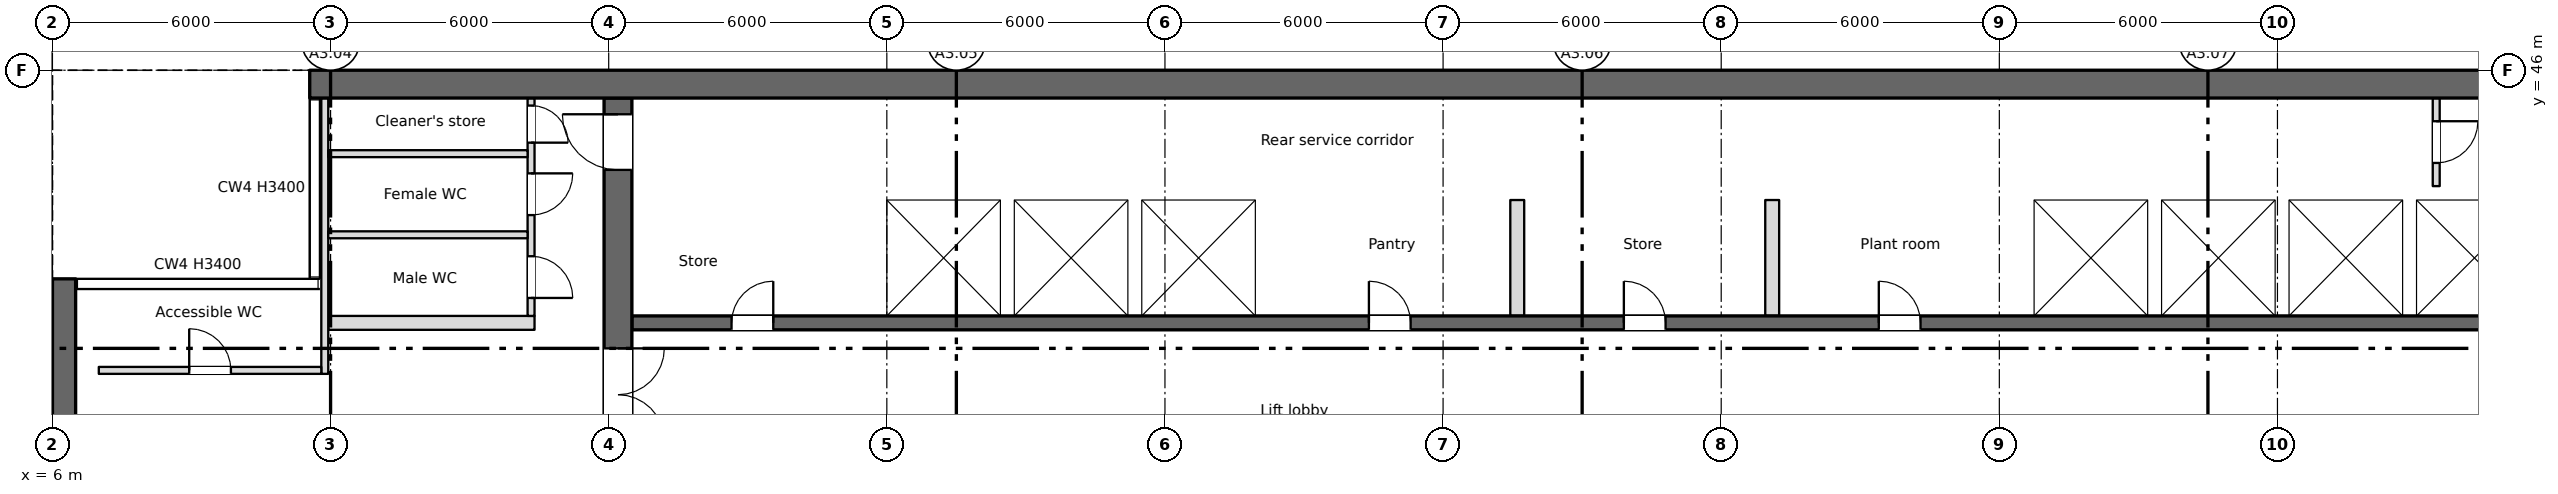
"""IFC4 building model, lengths in metres.
Left out: names, types, materials, properties, quantities, classifications, styles, units other than length and angle.
Written with IfcOpenShell. Run it as: python <this file> out.ifc"""

import sys

from ifc_helpers import new_model, si_unit, direction, frame, frame_2d, origin, place, context, subcontext, project, spatial, rectangle, extrude, element, fill, save


model = new_model("IFC4")
c1 = context("Model", 3, precision=1e-05, world=origin(), true_north=direction((0.0, 1.0)))
c2 = subcontext(c1, "Body", "Model", "MODEL_VIEW")
j1 = project(units=[si_unit("LENGTHUNIT", "METRE"), si_unit("PLANEANGLEUNIT", "RADIAN")], contexts=[c1])
p1 = place(None, origin())
s1 = spatial("IfcSite", under=j1, at=p1, CompositionType="ELEMENT")
p2 = place(p1, origin())
s2 = spatial("IfcBuilding", under=s1, at=p2, CompositionType="ELEMENT")
p3 = place(p2, frame((0.0, 0.0, 254.55)))
s3 = spatial("IfcBuildingStorey", under=s2, at=p3, CompositionType="ELEMENT", Elevation=254.55)
p4 = place(p3, frame((6.25, 8.5, 0.0), z_axis=(0.0, 0.0, 1.0), x_axis=(0.0, 1.0, 0.0)))
e1 = element("IfcWall", 1, at=p4, inside=s3, PredefinedType="SHEAR", context=c2, shape_type="SweptSolid", body=[
    extrude(rectangle(XDim=33.0, YDim=0.5, at=frame_2d((16.5, 0.0))), origin(), (0.0, 0.0, 1.0), 3.4),
])
p5 = place(p4, frame((1.2, 0.0, 0.6)))
e2 = element("IfcOpeningElement", 2, at=p5, cuts=e1, PredefinedType="OPENING", context=c2, shape_type="SweptSolid", body=[
    extrude(rectangle(XDim=0.6, YDim=2.4, at=frame_2d((0.3, 1.2))), frame((0.0, 0.26, 0.0), z_axis=(0.0, -1.0, 0.0), x_axis=(1.0, 0.0, 0.0)), (0.0, 0.0, 1.0), 0.52),
])
p6 = place(p4, frame((7.2, 0.0, 0.6)))
e3 = element("IfcOpeningElement", 3, at=p6, cuts=e1, PredefinedType="OPENING", context=c2, shape_type="SweptSolid", body=[
    extrude(rectangle(XDim=0.6, YDim=2.4, at=frame_2d((0.3, 1.2))), frame((0.0, 0.26, 0.0), z_axis=(0.0, -1.0, 0.0), x_axis=(1.0, 0.0, 0.0)), (0.0, 0.0, 1.0), 0.52),
])
p7 = place(p4, frame((13.2, 0.0, 0.6)))
e4 = element("IfcOpeningElement", 4, at=p7, cuts=e1, PredefinedType="OPENING", context=c2, shape_type="SweptSolid", body=[
    extrude(rectangle(XDim=0.6, YDim=2.4, at=frame_2d((0.3, 1.2))), frame((0.0, 0.26, 0.0), z_axis=(0.0, -1.0, 0.0), x_axis=(1.0, 0.0, 0.0)), (0.0, 0.0, 1.0), 0.52),
])
p8 = place(p3, frame((11.55, 45.7, 0.0), z_axis=(0.0, 0.0, 1.0), x_axis=(1.0, 0.0, 0.0)))
e5 = element("IfcWall", 5, at=p8, inside=s3, PredefinedType="SHEAR", context=c2, shape_type="SweptSolid", body=[
    extrude(rectangle(XDim=48.9, YDim=0.6, at=frame_2d((24.45, 0.0))), origin(), (0.0, 0.0, 1.0), 3.4),
])
p9 = place(p3, frame((6.75, 28.4, 0.0), z_axis=(0.0, 0.0, 1.0), x_axis=(0.0, 1.0, 0.0)))
e6 = element("IfcWall", 6, at=p9, inside=s3, PredefinedType="SHEAR", context=c2, shape_type="SweptSolid", body=[
    extrude(rectangle(XDim=12.85, YDim=0.5, at=frame_2d((6.425, 0.0))), origin(), (0.0, 0.0, 1.0), 3.4),
])
p10 = place(p3, frame((18.2, 28.4, 0.0), z_axis=(0.0, 0.0, 1.0), x_axis=(0.0, 1.0, 0.0)))
e7 = element("IfcWall", 7, at=p10, inside=s3, PredefinedType="SHEAR", context=c2, shape_type="SweptSolid", body=[
    extrude(rectangle(XDim=17.0, YDim=0.6, at=frame_2d((8.5, 0.0))), origin(), (0.0, 0.0, 1.0), 3.4),
])
p11 = place(p10, frame((9.6, 0.0, 0.0)))
e8 = element("IfcOpeningElement", 8, at=p11, cuts=e7, PredefinedType="OPENING", context=c2, shape_type="SweptSolid", body=[
    extrude(rectangle(XDim=2.0, YDim=2.1, at=frame_2d((1.0, 1.05))), frame((0.0, 0.31, 0.0), z_axis=(0.0, -1.0, 0.0), x_axis=(1.0, 0.0, 0.0)), (0.0, 0.0, 1.0), 0.62),
])
p12 = place(p10, frame((15.45, 0.0, 0.0)))
e9 = element("IfcOpeningElement", 9, at=p12, cuts=e7, PredefinedType="OPENING", context=c2, shape_type="SweptSolid", body=[
    extrude(rectangle(XDim=1.2, YDim=2.1, at=frame_2d((0.6, 1.05))), frame((0.0, 0.31, 0.0), z_axis=(0.0, -1.0, 0.0), x_axis=(1.0, 0.0, 0.0)), (0.0, 0.0, 1.0), 0.62),
])
p13 = place(p3, frame((18.5, 40.55, 0.0), z_axis=(0.0, 0.0, 1.0), x_axis=(1.0, 0.0, 0.0)))
e10 = element("IfcWall", 10, at=p13, inside=s3, PredefinedType="SHEAR", context=c2, shape_type="SweptSolid", body=[
    extrude(rectangle(XDim=41.0, YDim=0.3, at=frame_2d((20.5, 0.0))), origin(), (0.0, 0.0, 1.0), 3.4),
])
p14 = place(p13, frame((2.15, 0.0, 0.0)))
e11 = element("IfcOpeningElement", 11, at=p14, cuts=e10, PredefinedType="OPENING", context=c2, shape_type="SweptSolid", body=[
    extrude(rectangle(XDim=0.9, YDim=2.1, at=frame_2d((0.45, 1.05))), frame((0.0, 0.16, 0.0), z_axis=(0.0, -1.0, 0.0), x_axis=(1.0, 0.0, 0.0)), (0.0, 0.0, 1.0), 0.32),
])
p15 = place(p13, frame((15.9, 0.0, 0.0)))
e12 = element("IfcOpeningElement", 12, at=p15, cuts=e10, PredefinedType="OPENING", context=c2, shape_type="SweptSolid", body=[
    extrude(rectangle(XDim=0.9, YDim=2.1, at=frame_2d((0.45, 1.05))), frame((0.0, 0.16, 0.0), z_axis=(0.0, -1.0, 0.0), x_axis=(1.0, 0.0, 0.0)), (0.0, 0.0, 1.0), 0.32),
])
p16 = place(p13, frame((21.4, 0.0, 0.0)))
e13 = element("IfcOpeningElement", 13, at=p16, cuts=e10, PredefinedType="OPENING", context=c2, shape_type="SweptSolid", body=[
    extrude(rectangle(XDim=0.9, YDim=2.1, at=frame_2d((0.45, 1.05))), frame((0.0, 0.16, 0.0), z_axis=(0.0, -1.0, 0.0), x_axis=(1.0, 0.0, 0.0)), (0.0, 0.0, 1.0), 0.32),
])
p17 = place(p13, frame((26.9, 0.0, 0.0)))
e14 = element("IfcOpeningElement", 14, at=p17, cuts=e10, PredefinedType="OPENING", context=c2, shape_type="SweptSolid", body=[
    extrude(rectangle(XDim=0.9, YDim=2.1, at=frame_2d((0.45, 1.05))), frame((0.0, 0.16, 0.0), z_axis=(0.0, -1.0, 0.0), x_axis=(1.0, 0.0, 0.0)), (0.0, 0.0, 1.0), 0.32),
])
p18 = place(p13, frame((6.175, 0.0, 0.0)))
e15 = element("IfcOpeningElement", 15, at=p18, cuts=e10, PredefinedType="OPENING", context=c2, shape_type="SweptSolid", body=[
    extrude(rectangle(XDim=1.1, YDim=2.1, at=frame_2d((0.55, 1.05))), frame((0.0, 0.16, 0.0), z_axis=(0.0, -1.0, 0.0), x_axis=(1.0, 0.0, 0.0)), (0.0, 0.0, 1.0), 0.32),
])
p19 = place(p13, frame((8.925, 0.0, 0.0)))
e16 = element("IfcOpeningElement", 16, at=p19, cuts=e10, PredefinedType="OPENING", context=c2, shape_type="SweptSolid", body=[
    extrude(rectangle(XDim=1.1, YDim=2.1, at=frame_2d((0.55, 1.05))), frame((0.0, 0.16, 0.0), z_axis=(0.0, -1.0, 0.0), x_axis=(1.0, 0.0, 0.0)), (0.0, 0.0, 1.0), 0.32),
])
p20 = place(p13, frame((11.675, 0.0, 0.0)))
e17 = element("IfcOpeningElement", 17, at=p20, cuts=e10, PredefinedType="OPENING", context=c2, shape_type="SweptSolid", body=[
    extrude(rectangle(XDim=1.1, YDim=2.1, at=frame_2d((0.55, 1.05))), frame((0.0, 0.16, 0.0), z_axis=(0.0, -1.0, 0.0), x_axis=(1.0, 0.0, 0.0)), (0.0, 0.0, 1.0), 0.32),
])
p21 = place(p13, frame((30.925, 0.0, 0.0)))
e18 = element("IfcOpeningElement", 18, at=p21, cuts=e10, PredefinedType="OPENING", context=c2, shape_type="SweptSolid", body=[
    extrude(rectangle(XDim=1.1, YDim=2.1, at=frame_2d((0.55, 1.05))), frame((0.0, 0.16, 0.0), z_axis=(0.0, -1.0, 0.0), x_axis=(1.0, 0.0, 0.0)), (0.0, 0.0, 1.0), 0.32),
])
p22 = place(p13, frame((33.675, 0.0, 0.0)))
e19 = element("IfcOpeningElement", 19, at=p22, cuts=e10, PredefinedType="OPENING", context=c2, shape_type="SweptSolid", body=[
    extrude(rectangle(XDim=1.1, YDim=2.1, at=frame_2d((0.55, 1.05))), frame((0.0, 0.16, 0.0), z_axis=(0.0, -1.0, 0.0), x_axis=(1.0, 0.0, 0.0)), (0.0, 0.0, 1.0), 0.32),
])
p23 = place(p13, frame((36.375, 0.0, 0.0)))
e20 = element("IfcOpeningElement", 20, at=p23, cuts=e10, PredefinedType="OPENING", context=c2, shape_type="SweptSolid", body=[
    extrude(rectangle(XDim=1.2, YDim=2.1, at=frame_2d((0.6, 1.05))), frame((0.0, 0.16, 0.0), z_axis=(0.0, -1.0, 0.0), x_axis=(1.0, 0.0, 0.0)), (0.0, 0.0, 1.0), 0.32),
])
p24 = place(p13, frame((39.15, 0.0, 0.0)))
e21 = element("IfcOpeningElement", 21, at=p24, cuts=e10, PredefinedType="OPENING", context=c2, shape_type="SweptSolid", body=[
    extrude(rectangle(XDim=1.2, YDim=2.1, at=frame_2d((0.6, 1.05))), frame((0.0, 0.16, 0.0), z_axis=(0.0, -1.0, 0.0), x_axis=(1.0, 0.0, 0.0)), (0.0, 0.0, 1.0), 0.32),
])
p25 = place(p3, frame((18.5, 43.35, 0.0), z_axis=(0.0, 0.0, 1.0), x_axis=(1.0, 0.0, 0.0)))
e22 = element("IfcWall", 22, at=p25, inside=s3, PredefinedType="SHEAR", context=c2, shape_type="SweptSolid", body=[
    extrude(rectangle(XDim=41.0, YDim=0.3, at=frame_2d((20.5, 0.0))), origin(), (0.0, 0.0, 1.0), 3.4),
])
p26 = place(p3, frame((11.95, 40.55, 0.0), z_axis=(0.0, 0.0, 1.0), x_axis=(1.0, 0.0, 0.0)))
e23 = element("IfcWall", 23, at=p26, inside=s3, PredefinedType="PARTITIONING", context=c2, shape_type="SweptSolid", body=[
    extrude(rectangle(XDim=4.45, YDim=0.3, at=frame_2d((2.225, 0.0))), origin(), (0.0, 0.0, 1.0), 3.4),
])
for number, where, z_axis, x_axis in (
    (24, (23.85, 40.7, 0.0), (0.0, 0.0, 1.0), (0.0, 1.0, 0.0)),
    (25, (26.6, 40.7, 0.0), (0.0, 0.0, 1.0), (0.0, 1.0, 0.0)),
    (26, (29.35, 40.7, 0.0), (0.0, 0.0, 1.0), (0.0, 1.0, 0.0)),
    (27, (32.1, 40.7, 0.0), (0.0, 0.0, 1.0), (0.0, 1.0, 0.0)),
    (28, (48.6, 40.7, 0.0), (0.0, 0.0, 1.0), (0.0, 1.0, 0.0)),
    (29, (51.35, 40.7, 0.0), (0.0, 0.0, 1.0), (0.0, 1.0, 0.0)),
    (30, (54.1, 40.7, 0.0), (0.0, 0.0, 1.0), (0.0, 1.0, 0.0)),
    (31, (56.85, 40.7, 0.0), (0.0, 0.0, 1.0), (0.0, 1.0, 0.0)),
):
    element("IfcWall", number, at=place(p3, frame(where, z_axis=z_axis, x_axis=x_axis)), inside=s3, PredefinedType="SHEAR", context=c2, shape_type="SweptSolid", body=[
        extrude(rectangle(XDim=2.5, YDim=0.3, at=frame_2d((1.25, 0.0))), origin(), (0.0, 0.0, 1.0), 3.4),
    ])
p27 = place(p3, frame((16.325, 45.4, 0.0), z_axis=(0.0, 0.0, 1.0), x_axis=(0.0, -1.0, 0.0)))
e32 = element("IfcWall", 32, at=p27, inside=s3, PredefinedType="PARTITIONING", context=c2, shape_type="SweptSolid", body=[
    extrude(rectangle(XDim=4.7, YDim=0.15, at=frame_2d((2.35, 0.0))), origin(), (0.0, 0.0, 1.0), 3.4),
])
p28 = place(p27, frame((3.413, 0.0, 0.0)))
e33 = element("IfcOpeningElement", 33, at=p28, cuts=e32, PredefinedType="OPENING", context=c2, shape_type="SweptSolid", body=[
    extrude(rectangle(XDim=0.9, YDim=2.1, at=frame_2d((0.45, 1.05))), frame((0.0, 0.085, 0.0), z_axis=(0.0, -1.0, 0.0), x_axis=(1.0, 0.0, 0.0)), (0.0, 0.0, 1.0), 0.17),
])
p29 = place(p27, frame((1.625, 0.0, 0.0)))
e34 = element("IfcOpeningElement", 34, at=p29, cuts=e32, PredefinedType="OPENING", context=c2, shape_type="SweptSolid", body=[
    extrude(rectangle(XDim=0.9, YDim=2.1, at=frame_2d((0.45, 1.05))), frame((0.0, 0.085, 0.0), z_axis=(0.0, -1.0, 0.0), x_axis=(1.0, 0.0, 0.0)), (0.0, 0.0, 1.0), 0.17),
])
p30 = place(p27, frame((0.163, 0.0, 0.0)))
e35 = element("IfcOpeningElement", 35, at=p30, cuts=e32, PredefinedType="OPENING", context=c2, shape_type="SweptSolid", body=[
    extrude(rectangle(XDim=0.8, YDim=2.1, at=frame_2d((0.4, 1.05))), frame((0.0, 0.085, 0.0), z_axis=(0.0, -1.0, 0.0), x_axis=(1.0, 0.0, 0.0)), (0.0, 0.0, 1.0), 0.17),
])
p31 = place(p3, frame((11.875, 39.45, 0.0), z_axis=(0.0, 0.0, 1.0), x_axis=(0.0, 1.0, 0.0)))
e36 = element("IfcWall", 36, at=p31, inside=s3, PredefinedType="PARTITIONING", context=c2, shape_type="SweptSolid", body=[
    extrude(rectangle(XDim=5.95, YDim=0.15, at=frame_2d((2.975, 0.0))), origin(), (0.0, 0.0, 1.0), 3.4),
])
p32 = place(p3, frame((7.0, 39.525, 0.0), z_axis=(0.0, 0.0, 1.0), x_axis=(1.0, 0.0, 0.0)))
e37 = element("IfcWall", 37, at=p32, inside=s3, PredefinedType="PARTITIONING", context=c2, shape_type="SweptSolid", body=[
    extrude(rectangle(XDim=4.8, YDim=0.15, at=frame_2d((2.4, 0.0))), origin(), (0.0, 0.0, 1.0), 3.4),
])
p33 = place(p32, frame((1.95, 0.0, 0.0)))
e38 = element("IfcOpeningElement", 38, at=p33, cuts=e37, PredefinedType="OPENING", context=c2, shape_type="SweptSolid", body=[
    extrude(rectangle(XDim=0.9, YDim=2.1, at=frame_2d((0.45, 1.05))), frame((0.0, 0.085, 0.0), z_axis=(0.0, -1.0, 0.0), x_axis=(1.0, 0.0, 0.0)), (0.0, 0.0, 1.0), 0.17),
])
for number, where, z_axis, x_axis in (
    (39, (11.95, 42.45, 0.0), (0.0, 0.0, 1.0), (1.0, 0.0, 0.0)),
    (40, (11.95, 44.2, 0.0), (0.0, 0.0, 1.0), (1.0, 0.0, 0.0)),
):
    element("IfcWall", number, at=place(p3, frame(where, z_axis=z_axis, x_axis=x_axis)), inside=s3, PredefinedType="PARTITIONING", context=c2, shape_type="SweptSolid", body=[
        extrude(rectangle(XDim=4.3, YDim=0.15, at=frame_2d((2.15, 0.0))), origin(), (0.0, 0.0, 1.0), 3.4),
    ])
p34 = place(p3, frame((57.425, 45.4, 0.0), z_axis=(0.0, 0.0, 1.0), x_axis=(0.0, -1.0, 0.0)))
e41 = element("IfcWall", 41, at=p34, inside=s3, PredefinedType="PARTITIONING", context=c2, shape_type="SweptSolid", body=[
    extrude(rectangle(XDim=1.9, YDim=0.15, at=frame_2d((0.95, 0.0))), origin(), (0.0, 0.0, 1.0), 3.4),
])
p35 = place(p34, frame((0.5, 0.0, 0.0)))
e42 = element("IfcOpeningElement", 42, at=p35, cuts=e41, PredefinedType="OPENING", context=c2, shape_type="SweptSolid", body=[
    extrude(rectangle(XDim=0.9, YDim=2.1, at=frame_2d((0.45, 1.05))), frame((0.0, 0.085, 0.0), z_axis=(0.0, -1.0, 0.0), x_axis=(1.0, 0.0, 0.0)), (0.0, 0.0, 1.0), 0.17),
])
for number, where, z_axis, x_axis in (
    (43, (37.6, 40.7, 0.0), (0.0, 0.0, 1.0), (0.0, 1.0, 0.0)),
    (44, (43.1, 40.7, 0.0), (0.0, 0.0, 1.0), (0.0, 1.0, 0.0)),
):
    element("IfcWall", number, at=place(p3, frame(where, z_axis=z_axis, x_axis=x_axis)), inside=s3, PredefinedType="PARTITIONING", context=c2, shape_type="SweptSolid", body=[
        extrude(rectangle(XDim=2.5, YDim=0.3, at=frame_2d((1.25, 0.0))), origin(), (0.0, 0.0, 1.0), 3.4),
    ])
p36 = place(p33, origin())
e45 = element("IfcDoor", 45, at=p36, inside=s3, OperationType="SINGLE_SWING_LEFT", PredefinedType="DOOR", context=c2, shape_type="SweptSolid", body=[
    extrude(rectangle(XDim=0.9, YDim=2.1, at=frame_2d((0.45, 1.05))), frame((0.0, 0.025, 0.0), z_axis=(0.0, -1.0, 0.0), x_axis=(1.0, 0.0, 0.0)), (0.0, 0.0, 1.0), 0.05),
])
fill(e38, e45)
p37 = place(p28, origin())
e46 = element("IfcDoor", 46, at=p37, inside=s3, OperationType="SINGLE_SWING_RIGHT", PredefinedType="DOOR", context=c2, shape_type="SweptSolid", body=[
    extrude(rectangle(XDim=0.9, YDim=2.1, at=frame_2d((0.45, 1.05))), frame((0.0, 0.025, 0.0), z_axis=(0.0, -1.0, 0.0), x_axis=(1.0, 0.0, 0.0)), (0.0, 0.0, 1.0), 0.05),
])
fill(e33, e46)
p38 = place(p29, origin())
e47 = element("IfcDoor", 47, at=p38, inside=s3, OperationType="SINGLE_SWING_LEFT", PredefinedType="DOOR", context=c2, shape_type="SweptSolid", body=[
    extrude(rectangle(XDim=0.9, YDim=2.1, at=frame_2d((0.45, 1.05))), frame((0.0, 0.025, 0.0), z_axis=(0.0, -1.0, 0.0), x_axis=(1.0, 0.0, 0.0)), (0.0, 0.0, 1.0), 0.05),
])
fill(e34, e47)
p39 = place(p30, origin())
e48 = element("IfcDoor", 48, at=p39, inside=s3, OperationType="SINGLE_SWING_RIGHT", PredefinedType="DOOR", context=c2, shape_type="SweptSolid", body=[
    extrude(rectangle(XDim=0.8, YDim=2.1, at=frame_2d((0.4, 1.05))), frame((0.0, 0.025, 0.0), z_axis=(0.0, -1.0, 0.0), x_axis=(1.0, 0.0, 0.0)), (0.0, 0.0, 1.0), 0.05),
])
fill(e35, e48)
p40 = place(p35, origin())
e49 = element("IfcDoor", 49, at=p40, inside=s3, OperationType="SINGLE_SWING_LEFT", PredefinedType="DOOR", context=c2, shape_type="SweptSolid", body=[
    extrude(rectangle(XDim=0.9, YDim=2.1, at=frame_2d((0.45, 1.05))), frame((0.0, 0.025, 0.0), z_axis=(0.0, -1.0, 0.0), x_axis=(1.0, 0.0, 0.0)), (0.0, 0.0, 1.0), 0.05),
])
fill(e42, e49)
p41 = place(p14, origin())
e50 = element("IfcDoor", 50, at=p41, inside=s3, OperationType="SINGLE_SWING_RIGHT", PredefinedType="DOOR", context=c2, shape_type="SweptSolid", body=[
    extrude(rectangle(XDim=0.9, YDim=2.1, at=frame_2d((0.45, 1.05))), frame((0.0, 0.025, 0.0), z_axis=(0.0, -1.0, 0.0), x_axis=(1.0, 0.0, 0.0)), (0.0, 0.0, 1.0), 0.05),
])
fill(e11, e50)
p42 = place(p15, origin())
e51 = element("IfcDoor", 51, at=p42, inside=s3, OperationType="SINGLE_SWING_LEFT", PredefinedType="DOOR", context=c2, shape_type="SweptSolid", body=[
    extrude(rectangle(XDim=0.9, YDim=2.1, at=frame_2d((0.45, 1.05))), frame((0.0, 0.025, 0.0), z_axis=(0.0, -1.0, 0.0), x_axis=(1.0, 0.0, 0.0)), (0.0, 0.0, 1.0), 0.05),
])
fill(e12, e51)
p43 = place(p16, origin())
e52 = element("IfcDoor", 52, at=p43, inside=s3, OperationType="SINGLE_SWING_LEFT", PredefinedType="DOOR", context=c2, shape_type="SweptSolid", body=[
    extrude(rectangle(XDim=0.9, YDim=2.1, at=frame_2d((0.45, 1.05))), frame((0.0, 0.025, 0.0), z_axis=(0.0, -1.0, 0.0), x_axis=(1.0, 0.0, 0.0)), (0.0, 0.0, 1.0), 0.05),
])
fill(e13, e52)
p44 = place(p17, origin())
e53 = element("IfcDoor", 53, at=p44, inside=s3, OperationType="SINGLE_SWING_LEFT", PredefinedType="DOOR", context=c2, shape_type="SweptSolid", body=[
    extrude(rectangle(XDim=0.9, YDim=2.1, at=frame_2d((0.45, 1.05))), frame((0.0, 0.025, 0.0), z_axis=(0.0, -1.0, 0.0), x_axis=(1.0, 0.0, 0.0)), (0.0, 0.0, 1.0), 0.05),
])
fill(e14, e53)
p45 = place(p18, origin())
e54 = element("IfcDoor", 54, at=p45, inside=s3, OperationType="SLIDING_TO_LEFT", PredefinedType="DOOR", context=c2, shape_type="SweptSolid", body=[
    extrude(rectangle(XDim=1.1, YDim=2.1, at=frame_2d((0.55, 1.05))), frame((0.0, 0.025, 0.0), z_axis=(0.0, -1.0, 0.0), x_axis=(1.0, 0.0, 0.0)), (0.0, 0.0, 1.0), 0.05),
])
fill(e15, e54)
p46 = place(p19, origin())
e55 = element("IfcDoor", 55, at=p46, inside=s3, OperationType="SLIDING_TO_LEFT", PredefinedType="DOOR", context=c2, shape_type="SweptSolid", body=[
    extrude(rectangle(XDim=1.1, YDim=2.1, at=frame_2d((0.55, 1.05))), frame((0.0, 0.025, 0.0), z_axis=(0.0, -1.0, 0.0), x_axis=(1.0, 0.0, 0.0)), (0.0, 0.0, 1.0), 0.05),
])
fill(e16, e55)
p47 = place(p20, origin())
e56 = element("IfcDoor", 56, at=p47, inside=s3, OperationType="SLIDING_TO_LEFT", PredefinedType="DOOR", context=c2, shape_type="SweptSolid", body=[
    extrude(rectangle(XDim=1.1, YDim=2.1, at=frame_2d((0.55, 1.05))), frame((0.0, 0.025, 0.0), z_axis=(0.0, -1.0, 0.0), x_axis=(1.0, 0.0, 0.0)), (0.0, 0.0, 1.0), 0.05),
])
fill(e17, e56)
p48 = place(p21, origin())
e57 = element("IfcDoor", 57, at=p48, inside=s3, OperationType="SLIDING_TO_LEFT", PredefinedType="DOOR", context=c2, shape_type="SweptSolid", body=[
    extrude(rectangle(XDim=1.1, YDim=2.1, at=frame_2d((0.55, 1.05))), frame((0.0, 0.025, 0.0), z_axis=(0.0, -1.0, 0.0), x_axis=(1.0, 0.0, 0.0)), (0.0, 0.0, 1.0), 0.05),
])
fill(e18, e57)
p49 = place(p22, origin())
e58 = element("IfcDoor", 58, at=p49, inside=s3, OperationType="SLIDING_TO_LEFT", PredefinedType="DOOR", context=c2, shape_type="SweptSolid", body=[
    extrude(rectangle(XDim=1.1, YDim=2.1, at=frame_2d((0.55, 1.05))), frame((0.0, 0.025, 0.0), z_axis=(0.0, -1.0, 0.0), x_axis=(1.0, 0.0, 0.0)), (0.0, 0.0, 1.0), 0.05),
])
fill(e19, e58)
p50 = place(p23, origin())
e59 = element("IfcDoor", 59, at=p50, inside=s3, OperationType="SLIDING_TO_LEFT", PredefinedType="DOOR", context=c2, shape_type="SweptSolid", body=[
    extrude(rectangle(XDim=1.2, YDim=2.1, at=frame_2d((0.6, 1.05))), frame((0.0, 0.025, 0.0), z_axis=(0.0, -1.0, 0.0), x_axis=(1.0, 0.0, 0.0)), (0.0, 0.0, 1.0), 0.05),
])
fill(e20, e59)
p51 = place(p24, origin())
e60 = element("IfcDoor", 60, at=p51, inside=s3, OperationType="SLIDING_TO_LEFT", PredefinedType="DOOR", context=c2, shape_type="SweptSolid", body=[
    extrude(rectangle(XDim=1.2, YDim=2.1, at=frame_2d((0.6, 1.05))), frame((0.0, 0.025, 0.0), z_axis=(0.0, -1.0, 0.0), x_axis=(1.0, 0.0, 0.0)), (0.0, 0.0, 1.0), 0.05),
])
fill(e21, e60)
p52 = place(p11, origin())
e61 = element("IfcDoor", 61, at=p52, inside=s3, OperationType="DOUBLE_DOOR_SINGLE_SWING", PredefinedType="DOOR", context=c2, shape_type="SweptSolid", body=[
    extrude(rectangle(XDim=2.0, YDim=2.1, at=frame_2d((1.0, 1.05))), frame((0.0, 0.025, 0.0), z_axis=(0.0, -1.0, 0.0), x_axis=(1.0, 0.0, 0.0)), (0.0, 0.0, 1.0), 0.05),
])
fill(e8, e61)
p53 = place(p12, origin())
e62 = element("IfcDoor", 62, at=p53, inside=s3, OperationType="SINGLE_SWING_RIGHT", PredefinedType="DOOR", context=c2, shape_type="SweptSolid", body=[
    extrude(rectangle(XDim=1.2, YDim=2.1, at=frame_2d((0.6, 1.05))), frame((0.0, 0.025, 0.0), z_axis=(0.0, -1.0, 0.0), x_axis=(1.0, 0.0, 0.0)), (0.0, 0.0, 1.0), 0.05),
])
fill(e9, e62)
save(model, sys.argv[1])
